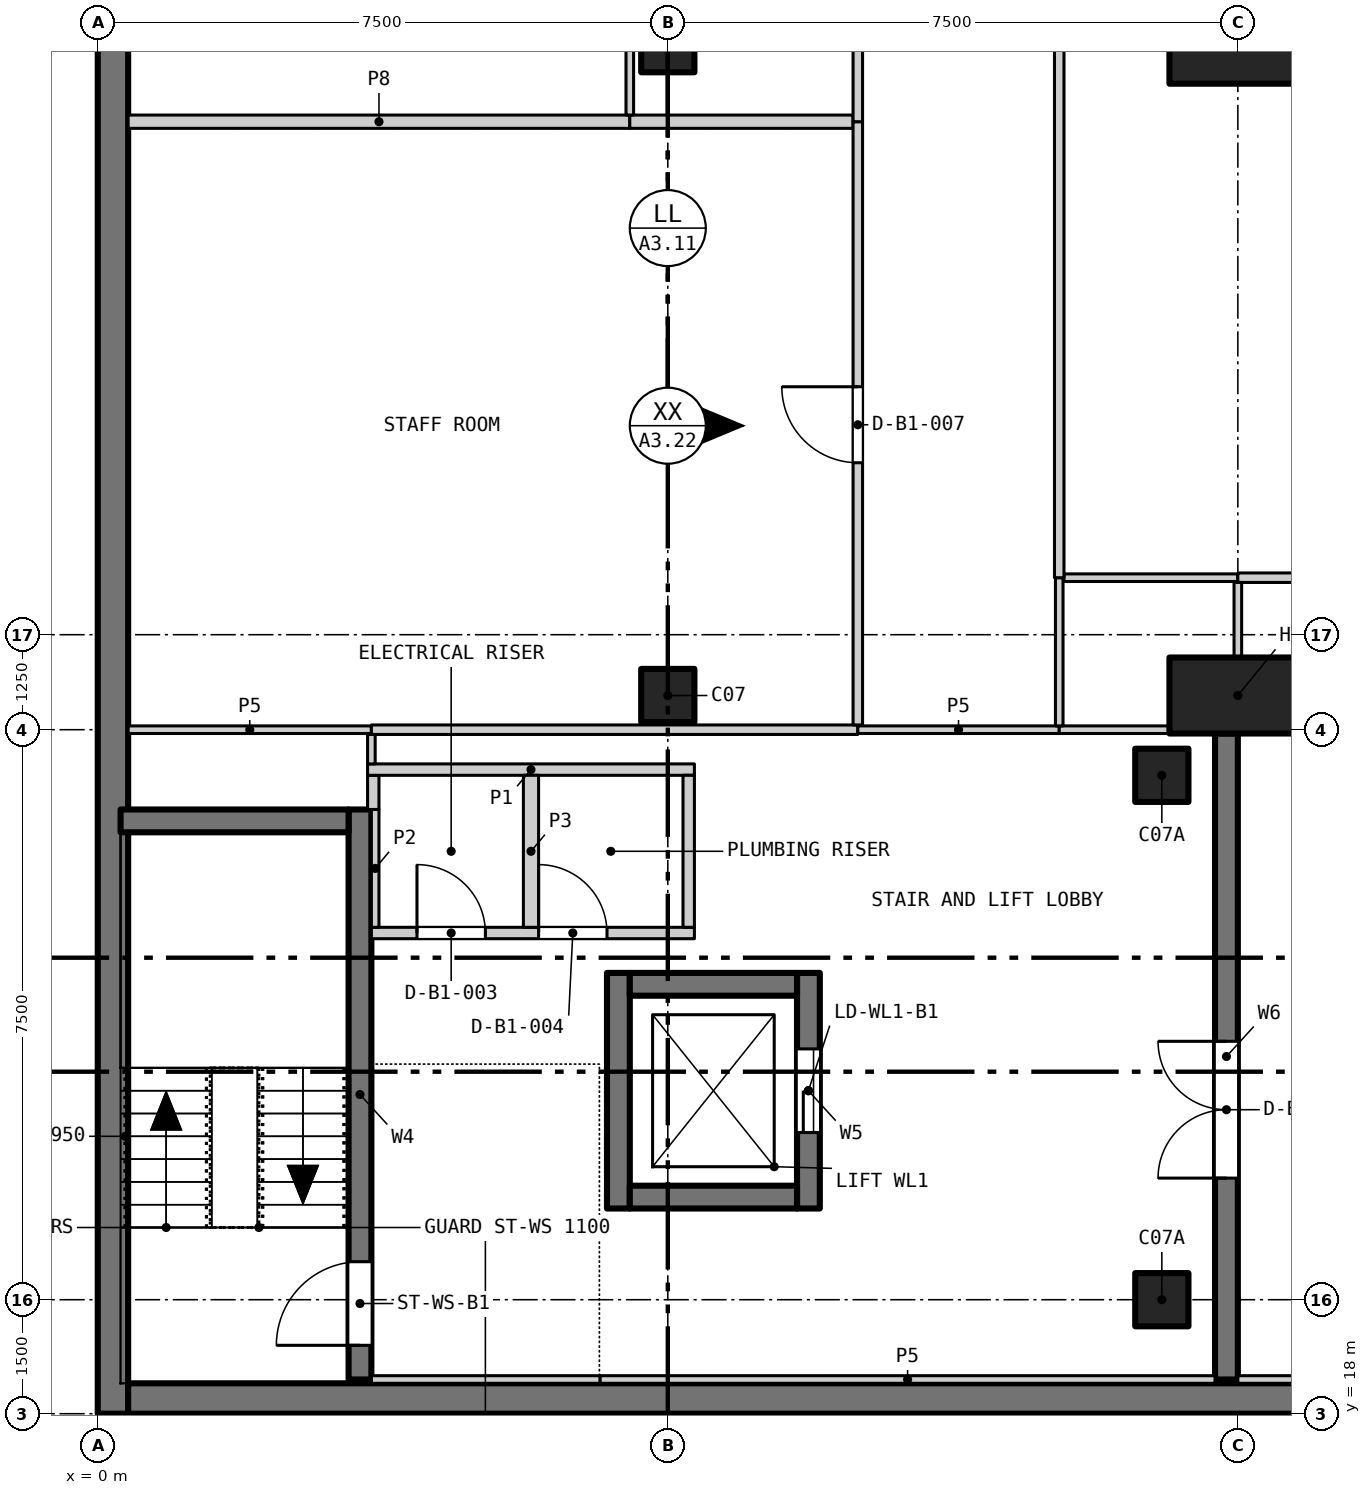
"""IFC4 building model, lengths in metres.
Left out: names, types, materials, properties, quantities, classifications, styles, units other than length and angle.
Written with IfcOpenShell. Run it as: python <this file> out.ifc"""

import sys

from ifc_helpers import new_model, si_unit, direction, frame, frame_2d, origin, origin_2d, place, context, subcontext, project, spatial, rectangle, extrude, element, fill, save


model = new_model("IFC4")
c1 = context("Model", 3, precision=1e-05, world=origin(), true_north=direction((0.0, 1.0)))
c2 = subcontext(c1, "Body", "Model", "MODEL_VIEW")
j1 = project(units=[si_unit("LENGTHUNIT", "METRE"), si_unit("PLANEANGLEUNIT", "RADIAN")], contexts=[c1])
p1 = place(None, origin())
s1 = spatial("IfcSite", under=j1, at=p1, CompositionType="ELEMENT")
p2 = place(p1, origin())
s2 = spatial("IfcBuilding", under=s1, at=p2, CompositionType="ELEMENT")
p3 = place(p2, frame((0.0, 0.0, -10.0)))
s3 = spatial("IfcBuildingStorey", under=s2, at=p3, CompositionType="ELEMENT", Elevation=-10.0)
for number, where, z_axis, x_axis in (
    (1, (7.5, 27.45, -1.4), (0.0, 0.0, 1.0), (1.0, 0.0, 0.0)),
    (2, (7.5, 36.0, -1.4), (0.0, 0.0, 1.0), (1.0, 0.0, 0.0)),
    (3, (14.0, 19.5, -1.4), (0.0, 0.0, 1.0), (1.0, 0.0, 0.0)),
    (4, (14.0, 26.4, -1.4), (0.0, 0.0, 1.0), (1.0, 0.0, 0.0)),
):
    element("IfcColumn", number, at=place(p3, frame(where, z_axis=z_axis, x_axis=x_axis)), inside=s3, PredefinedType="COLUMN", context=c2, shape_type="SweptSolid", body=[
        extrude(rectangle(XDim=0.7, YDim=0.7, at=origin_2d()), origin(), (0.0, 0.0, 1.0), 6.4),
    ])
p4 = place(p3, frame((0.2, 18.0, -1.4), z_axis=(0.0, 0.0, 1.0), x_axis=(0.0, 1.0, 0.0)))
e5 = element("IfcWall", 5, at=p4, inside=s3, PredefinedType="SOLIDWALL", context=c2, shape_type="SweptSolid", body=[
    extrude(rectangle(XDim=108.0, YDim=0.4, at=frame_2d((54.0, 0.0))), origin(), (0.0, 0.0, 1.0), 6.4),
])
p5 = place(p3, frame((0.4, 18.2, -1.4), z_axis=(0.0, 0.0, 1.0), x_axis=(1.0, 0.0, 0.0)))
e6 = element("IfcWall", 6, at=p5, inside=s3, PredefinedType="SOLIDWALL", context=c2, shape_type="SweptSolid", body=[
    extrude(rectangle(XDim=57.2, YDim=0.4, at=frame_2d((28.6, 0.0))), origin(), (0.0, 0.0, 1.0), 6.4),
])
p6 = place(p3, frame((14.85, 18.45, -1.4), z_axis=(0.0, 0.0, 1.0), x_axis=(0.0, 1.0, 0.0)))
e7 = element("IfcWall", 7, at=p6, inside=s3, PredefinedType="SOLIDWALL", context=c2, shape_type="SweptSolid", body=[
    extrude(rectangle(XDim=8.5, YDim=0.3, at=frame_2d((4.25, 0.0))), origin(), (0.0, 0.0, 1.0), 6.4),
])
p7 = place(p6, frame((2.65, 0.0, 1.4)))
e8 = element("IfcOpeningElement", 8, at=p7, cuts=e7, PredefinedType="OPENING", context=c2, shape_type="SweptSolid", body=[
    extrude(rectangle(XDim=1.8, YDim=2.1, at=frame_2d((0.9, 1.05))), frame((0.0, 0.16, 0.0), z_axis=(0.0, -1.0, 0.0), x_axis=(1.0, 0.0, 0.0)), (0.0, 0.0, 1.0), 0.32),
])
p8 = place(p3, frame((3.45, 18.45, 0.0), z_axis=(0.0, 0.0, 1.0), x_axis=(0.0, 1.0, 0.0)))
e9 = element("IfcWall", 9, at=p8, inside=s3, PredefinedType="SHEAR", context=c2, shape_type="SweptSolid", body=[
    extrude(rectangle(XDim=7.5, YDim=0.3, at=frame_2d((3.75, 0.0))), origin(), (0.0, 0.0, 1.0), 5.0),
])
p9 = place(p8, frame((0.45, 0.0, 0.0)))
e10 = element("IfcOpeningElement", 10, at=p9, cuts=e9, PredefinedType="OPENING", context=c2, shape_type="SweptSolid", body=[
    extrude(rectangle(XDim=1.1, YDim=2.1, at=frame_2d((0.55, 1.05))), frame((0.0, 0.16, 0.0), z_axis=(0.0, -1.0, 0.0), x_axis=(1.0, 0.0, 0.0)), (0.0, 0.0, 1.0), 0.32),
])
p10 = place(p3, frame((0.3, 25.8, 0.0), z_axis=(0.0, 0.0, 1.0), x_axis=(1.0, 0.0, 0.0)))
e11 = element("IfcWall", 11, at=p10, inside=s3, PredefinedType="SHEAR", context=c2, shape_type="SweptSolid", body=[
    extrude(rectangle(XDim=3.0, YDim=0.3, at=frame_2d((1.5, 0.0))), origin(), (0.0, 0.0, 1.0), 5.0),
])
p11 = place(p3, frame((6.85, 20.7, -1.4), z_axis=(0.0, 0.0, 1.0), x_axis=(0.0, 1.0, 0.0)))
e12 = element("IfcWall", 12, at=p11, inside=s3, PredefinedType="SHEAR", context=c2, shape_type="SweptSolid", body=[
    extrude(rectangle(XDim=3.1, YDim=0.3, at=frame_2d((1.55, 0.0))), origin(), (0.0, 0.0, 1.0), 6.4),
])
p12 = place(p3, frame((9.35, 20.7, -1.4), z_axis=(0.0, 0.0, 1.0), x_axis=(0.0, 1.0, 0.0)))
e13 = element("IfcWall", 13, at=p12, inside=s3, PredefinedType="SHEAR", context=c2, shape_type="SweptSolid", body=[
    extrude(rectangle(XDim=3.1, YDim=0.3, at=frame_2d((1.55, 0.0))), origin(), (0.0, 0.0, 1.0), 6.4),
])
p13 = place(p12, frame((1.0, 0.0, 1.4)))
e14 = element("IfcOpeningElement", 14, at=p13, cuts=e13, PredefinedType="OPENING", context=c2, shape_type="SweptSolid", body=[
    extrude(rectangle(XDim=1.1, YDim=2.1, at=frame_2d((0.55, 1.05))), frame((0.0, 0.16, 0.0), z_axis=(0.0, -1.0, 0.0), x_axis=(1.0, 0.0, 0.0)), (0.0, 0.0, 1.0), 0.32),
])
for number, where, z_axis, x_axis in (
    (15, (7.0, 20.85, -1.4), (0.0, 0.0, 1.0), (1.0, 0.0, 0.0)),
    (16, (7.0, 23.65, -1.4), (0.0, 0.0, 1.0), (1.0, 0.0, 0.0)),
):
    element("IfcWall", number, at=place(p3, frame(where, z_axis=z_axis, x_axis=x_axis)), inside=s3, PredefinedType="SHEAR", context=c2, shape_type="SweptSolid", body=[
        extrude(rectangle(XDim=2.2, YDim=0.3, at=frame_2d((1.1, 0.0))), origin(), (0.0, 0.0, 1.0), 6.4),
    ])
for number, where, z_axis, x_axis in (
    (17, (15.0, 27.45, -1.4), (0.0, 0.0, 1.0), (1.0, 0.0, 0.0)),
    (18, (15.0, 36.0, -1.4), (0.0, 0.0, 1.0), (1.0, 0.0, 0.0)),
):
    element("IfcColumn", number, at=place(p3, frame(where, z_axis=z_axis, x_axis=x_axis)), inside=s3, PredefinedType="COLUMN", context=c2, shape_type="SweptSolid", body=[
        extrude(rectangle(XDim=1.8, YDim=1.0, at=origin_2d()), origin(), (0.0, 0.0, 1.0), 6.4),
    ])
p14 = place(p3, frame((3.625, 25.95, 0.0), z_axis=(0.0, 0.0, 1.0), x_axis=(0.0, 1.0, 0.0)))
e19 = element("IfcWall", 19, at=p14, inside=s3, PredefinedType="PARTITIONING", context=c2, shape_type="SweptSolid", body=[
    extrude(rectangle(XDim=0.45, YDim=0.15, at=frame_2d((0.225, 0.0))), origin(), (0.0, 0.0, 1.0), 4.75),
])
p15 = place(p3, frame((3.55, 26.475, 0.0), z_axis=(0.0, 0.0, 1.0), x_axis=(1.0, 0.0, 0.0)))
e20 = element("IfcWall", 20, at=p15, inside=s3, PredefinedType="PARTITIONING", context=c2, shape_type="SweptSolid", body=[
    extrude(rectangle(XDim=4.3, YDim=0.15, at=frame_2d((2.15, 0.0))), origin(), (0.0, 0.0, 1.0), 3.35),
])
p16 = place(p3, frame((3.6, 24.325, 0.0), z_axis=(0.0, 0.0, 1.0), x_axis=(1.0, 0.0, 0.0)))
e21 = element("IfcWall", 21, at=p16, inside=s3, PredefinedType="PARTITIONING", context=c2, shape_type="SweptSolid", body=[
    extrude(rectangle(XDim=4.25, YDim=0.15, at=frame_2d((2.125, 0.0))), origin(), (0.0, 0.0, 1.0), 4.75),
])
p17 = place(p16, frame((0.6, 0.0, 0.0)))
e22 = element("IfcOpeningElement", 22, at=p17, cuts=e21, PredefinedType="OPENING", context=c2, shape_type="SweptSolid", body=[
    extrude(rectangle(XDim=0.9, YDim=2.1, at=frame_2d((0.45, 1.05))), frame((0.0, 0.085, 0.0), z_axis=(0.0, -1.0, 0.0), x_axis=(1.0, 0.0, 0.0)), (0.0, 0.0, 1.0), 0.17),
])
p18 = place(p16, frame((2.2, 0.0, 0.0)))
e23 = element("IfcOpeningElement", 23, at=p18, cuts=e21, PredefinedType="OPENING", context=c2, shape_type="SweptSolid", body=[
    extrude(rectangle(XDim=0.9, YDim=2.1, at=frame_2d((0.45, 1.05))), frame((0.0, 0.085, 0.0), z_axis=(0.0, -1.0, 0.0), x_axis=(1.0, 0.0, 0.0)), (0.0, 0.0, 1.0), 0.17),
])
p19 = place(p3, frame((3.65, 24.4, 0.0), z_axis=(0.0, 0.0, 1.0), x_axis=(0.0, 1.0, 0.0)))
e24 = element("IfcWall", 24, at=p19, inside=s3, PredefinedType="PARTITIONING", context=c2, shape_type="SweptSolid", body=[
    extrude(rectangle(XDim=1.55, YDim=0.1, at=frame_2d((0.775, 0.0))), origin(), (0.0, 0.0, 1.0), 4.75),
])
p20 = place(p3, frame((5.7, 24.4, 0.0), z_axis=(0.0, 0.0, 1.0), x_axis=(0.0, 1.0, 0.0)))
e25 = element("IfcWall", 25, at=p20, inside=s3, PredefinedType="PARTITIONING", context=c2, shape_type="SweptSolid", body=[
    extrude(rectangle(XDim=2.0, YDim=0.2, at=frame_2d((1.0, 0.0))), origin(), (0.0, 0.0, 1.0), 4.75),
])
p21 = place(p3, frame((7.775, 24.4, 0.0), z_axis=(0.0, 0.0, 1.0), x_axis=(0.0, 1.0, 0.0)))
e26 = element("IfcWall", 26, at=p21, inside=s3, PredefinedType="PARTITIONING", context=c2, shape_type="SweptSolid", body=[
    extrude(rectangle(XDim=2.0, YDim=0.15, at=frame_2d((1.0, 0.0))), origin(), (0.0, 0.0, 1.0), 4.75),
])
p22 = place(p3, frame((3.6, 18.45, 0.0), z_axis=(0.0, 0.0, 1.0), x_axis=(1.0, 0.0, 0.0)))
e27 = element("IfcWall", 27, at=p22, inside=s3, PredefinedType="PARTITIONING", context=c2, shape_type="SweptSolid", body=[
    extrude(rectangle(XDim=3.01, YDim=0.1, at=frame_2d((1.505, 0.0))), origin(), (0.0, 0.0, 1.0), 4.75),
])
p23 = place(p3, frame((6.61, 18.45, 0.0), z_axis=(0.0, 0.0, 1.0), x_axis=(1.0, 0.0, 0.0)))
e28 = element("IfcWall", 28, at=p23, inside=s3, PredefinedType="PARTITIONING", context=c2, shape_type="SweptSolid", body=[
    extrude(rectangle(XDim=8.09, YDim=0.1, at=frame_2d((4.045, 0.0))), origin(), (0.0, 0.0, 1.0), 4.75),
])
p24 = place(p3, frame((15.0, 18.45, 0.0), z_axis=(0.0, 0.0, 1.0), x_axis=(1.0, 0.0, 0.0)))
e29 = element("IfcWall", 29, at=p24, inside=s3, PredefinedType="PARTITIONING", context=c2, shape_type="SweptSolid", body=[
    extrude(rectangle(XDim=28.0, YDim=0.1, at=frame_2d((14.0, 0.0))), origin(), (0.0, 0.0, 1.0), 4.75),
])
p25 = place(p3, frame((0.4, 27.0, 0.0), z_axis=(0.0, 0.0, 1.0), x_axis=(1.0, 0.0, 0.0)))
e30 = element("IfcWall", 30, at=p25, inside=s3, PredefinedType="PARTITIONING", context=c2, shape_type="SweptSolid", body=[
    extrude(rectangle(XDim=3.2, YDim=0.1, at=frame_2d((1.6, 0.0))), origin(), (0.0, 0.0, 1.0), 4.75),
])
p26 = place(p3, frame((3.6, 27.0, 0.0), z_axis=(0.0, 0.0, 1.0), x_axis=(1.0, 0.0, 0.0)))
e31 = element("IfcWall", 31, at=p26, inside=s3, PredefinedType="PARTITIONING", context=c2, shape_type="SweptSolid", body=[
    extrude(rectangle(XDim=6.4, YDim=0.125, at=frame_2d((3.2, 0.0))), origin(), (0.0, 0.0, 1.0), 4.75),
])
p27 = place(p3, frame((10.0, 27.0, 0.0), z_axis=(0.0, 0.0, 1.0), x_axis=(1.0, 0.0, 0.0)))
e32 = element("IfcWall", 32, at=p27, inside=s3, PredefinedType="PARTITIONING", context=c2, shape_type="SweptSolid", body=[
    extrude(rectangle(XDim=2.65, YDim=0.1, at=frame_2d((1.325, 0.0))), origin(), (0.0, 0.0, 1.0), 4.75),
])
p28 = place(p3, frame((12.65, 27.0, 0.0), z_axis=(0.0, 0.0, 1.0), x_axis=(1.0, 0.0, 0.0)))
e33 = element("IfcWall", 33, at=p28, inside=s3, PredefinedType="PARTITIONING", context=c2, shape_type="SweptSolid", body=[
    extrude(rectangle(XDim=1.45, YDim=0.1, at=frame_2d((0.725, 0.0))), origin(), (0.0, 0.0, 1.0), 4.75),
])
p29 = place(p3, frame((12.712, 29.0, 0.0), z_axis=(0.0, 0.0, 1.0), x_axis=(1.0, 0.0, 0.0)))
e34 = element("IfcWall", 34, at=p29, inside=s3, PredefinedType="PARTITIONING", context=c2, shape_type="SweptSolid", body=[
    extrude(rectangle(XDim=2.288, YDim=0.1, at=frame_2d((1.144, 0.0))), origin(), (0.0, 0.0, 1.0), 4.75),
])
p30 = place(p3, frame((15.0, 29.0, 0.0), z_axis=(0.0, 0.0, 1.0), x_axis=(1.0, 0.0, 0.0)))
e35 = element("IfcWall", 35, at=p30, inside=s3, PredefinedType="PARTITIONING", context=c2, shape_type="SweptSolid", body=[
    extrude(rectangle(XDim=14.99, YDim=0.125, at=frame_2d((7.495, 0.0))), origin(), (0.0, 0.0, 1.0), 4.75),
])
p31 = place(p3, frame((0.4, 35.0, 0.0), z_axis=(0.0, 0.0, 1.0), x_axis=(1.0, 0.0, 0.0)))
e36 = element("IfcWall", 36, at=p31, inside=s3, PredefinedType="PARTITIONING", context=c2, shape_type="SweptSolid", body=[
    extrude(rectangle(XDim=6.6, YDim=0.175, at=frame_2d((3.3, 0.0))), origin(), (0.0, 0.0, 1.0), 4.75),
])
p32 = place(p3, frame((7.0, 35.0, 0.0), z_axis=(0.0, 0.0, 1.0), x_axis=(1.0, 0.0, 0.0)))
e37 = element("IfcWall", 37, at=p32, inside=s3, PredefinedType="PARTITIONING", context=c2, shape_type="SweptSolid", body=[
    extrude(rectangle(XDim=2.938, YDim=0.175, at=frame_2d((1.469, 0.0))), origin(), (0.0, 0.0, 1.0), 4.75),
])
p33 = place(p3, frame((3.6, 26.55, 0.0), z_axis=(0.0, 0.0, 1.0), x_axis=(0.0, 1.0, 0.0)))
e38 = element("IfcWall", 38, at=p33, inside=s3, PredefinedType="PARTITIONING", context=c2, shape_type="SweptSolid", body=[
    extrude(rectangle(XDim=0.387, YDim=0.1, at=frame_2d((0.194, 0.0))), origin(), (0.0, 0.0, 1.0), 4.75),
])
p34 = place(p3, frame((7.0, 35.087, 0.0), z_axis=(0.0, 0.0, 1.0), x_axis=(0.0, 1.0, 0.0)))
e39 = element("IfcWall", 39, at=p34, inside=s3, PredefinedType="PARTITIONING", context=c2, shape_type="SweptSolid", body=[
    extrude(rectangle(XDim=2.913, YDim=0.1, at=frame_2d((1.456, 0.0))), origin(), (0.0, 0.0, 1.0), 4.75),
])
p35 = place(p34, frame((1.3, 0.0, 0.0)))
e40 = element("IfcOpeningElement", 40, at=p35, cuts=e39, PredefinedType="OPENING", context=c2, shape_type="SweptSolid", body=[
    extrude(rectangle(XDim=1.0, YDim=2.1, at=frame_2d((0.5, 1.05))), frame((0.0, 0.06, 0.0), z_axis=(0.0, -1.0, 0.0), x_axis=(1.0, 0.0, 0.0)), (0.0, 0.0, 1.0), 0.12),
])
p36 = place(p3, frame((10.0, 27.062, 0.0), z_axis=(0.0, 0.0, 1.0), x_axis=(0.0, 1.0, 0.0)))
e41 = element("IfcWall", 41, at=p36, inside=s3, PredefinedType="PARTITIONING", context=c2, shape_type="SweptSolid", body=[
    extrude(rectangle(XDim=7.938, YDim=0.125, at=frame_2d((3.969, 0.0))), origin(), (0.0, 0.0, 1.0), 4.75),
])
p37 = place(p36, frame((3.45, 0.0, 0.0)))
e42 = element("IfcOpeningElement", 42, at=p37, cuts=e41, PredefinedType="OPENING", context=c2, shape_type="SweptSolid", body=[
    extrude(rectangle(XDim=1.0, YDim=2.1, at=frame_2d((0.5, 1.05))), frame((0.0, 0.073, 0.0), z_axis=(0.0, -1.0, 0.0), x_axis=(1.0, 0.0, 0.0)), (0.0, 0.0, 1.0), 0.145),
])
p38 = place(p3, frame((10.0, 35.0, 0.0), z_axis=(0.0, 0.0, 1.0), x_axis=(0.0, 1.0, 0.0)))
e43 = element("IfcWall", 43, at=p38, inside=s3, PredefinedType="PARTITIONING", context=c2, shape_type="SweptSolid", body=[
    extrude(rectangle(XDim=9.0, YDim=0.125, at=frame_2d((4.5, 0.0))), origin(), (0.0, 0.0, 1.0), 4.75),
])
p39 = place(p38, frame((4.0, 0.0, 0.0)))
e44 = element("IfcOpeningElement", 44, at=p39, cuts=e43, PredefinedType="OPENING", context=c2, shape_type="SweptSolid", body=[
    extrude(rectangle(XDim=1.0, YDim=2.1, at=frame_2d((0.5, 1.05))), frame((0.0, 0.073, 0.0), z_axis=(0.0, -1.0, 0.0), x_axis=(1.0, 0.0, 0.0)), (0.0, 0.0, 1.0), 0.145),
])
p40 = place(p3, frame((12.65, 27.05, 0.0), z_axis=(0.0, 0.0, 1.0), x_axis=(0.0, 1.0, 0.0)))
e45 = element("IfcWall", 45, at=p40, inside=s3, PredefinedType="PARTITIONING", context=c2, shape_type="SweptSolid", body=[
    extrude(rectangle(XDim=1.95, YDim=0.1, at=frame_2d((0.975, 0.0))), origin(), (0.0, 0.0, 1.0), 4.75),
])
p41 = place(p3, frame((12.65, 29.0, 0.0), z_axis=(0.0, 0.0, 1.0), x_axis=(0.0, 1.0, 0.0)))
e46 = element("IfcWall", 46, at=p41, inside=s3, PredefinedType="PARTITIONING", context=c2, shape_type="SweptSolid", body=[
    extrude(rectangle(XDim=20.5, YDim=0.125, at=frame_2d((10.25, 0.0))), origin(), (0.0, 0.0, 1.0), 4.75),
])
p42 = place(p3, frame((15.0, 27.95, 0.0), z_axis=(0.0, 0.0, 1.0), x_axis=(0.0, 1.0, 0.0)))
e47 = element("IfcWall", 47, at=p42, inside=s3, PredefinedType="PARTITIONING", context=c2, shape_type="SweptSolid", body=[
    extrude(rectangle(XDim=0.988, YDim=0.1, at=frame_2d((0.494, 0.0))), origin(), (0.0, 0.0, 1.0), 4.75),
])
p43 = place(p7, origin())
e48 = element("IfcDoor", 48, at=p43, inside=s3, OperationType="DOUBLE_DOOR_SINGLE_SWING", PredefinedType="DOOR", context=c2, shape_type="SweptSolid", body=[
    extrude(rectangle(XDim=1.8, YDim=2.1, at=frame_2d((0.9, 1.05))), frame((0.0, 0.025, 0.0), z_axis=(0.0, -1.0, 0.0), x_axis=(1.0, 0.0, 0.0)), (0.0, 0.0, 1.0), 0.05),
])
fill(e8, e48)
p44 = place(p17, origin())
e49 = element("IfcDoor", 49, at=p44, inside=s3, OperationType="SINGLE_SWING_LEFT", PredefinedType="DOOR", context=c2, shape_type="SweptSolid", body=[
    extrude(rectangle(XDim=0.9, YDim=2.1, at=frame_2d((0.45, 1.05))), frame((0.0, 0.025, 0.0), z_axis=(0.0, -1.0, 0.0), x_axis=(1.0, 0.0, 0.0)), (0.0, 0.0, 1.0), 0.05),
])
fill(e22, e49)
p45 = place(p18, origin())
e50 = element("IfcDoor", 50, at=p45, inside=s3, OperationType="SINGLE_SWING_LEFT", PredefinedType="DOOR", context=c2, shape_type="SweptSolid", body=[
    extrude(rectangle(XDim=0.9, YDim=2.1, at=frame_2d((0.45, 1.05))), frame((0.0, 0.025, 0.0), z_axis=(0.0, -1.0, 0.0), x_axis=(1.0, 0.0, 0.0)), (0.0, 0.0, 1.0), 0.05),
])
fill(e23, e50)
p46 = place(p37, origin())
e51 = element("IfcDoor", 51, at=p46, inside=s3, OperationType="SINGLE_SWING_RIGHT", PredefinedType="DOOR", context=c2, shape_type="SweptSolid", body=[
    extrude(rectangle(XDim=1.0, YDim=2.1, at=frame_2d((0.5, 1.05))), frame((0.0, 0.025, 0.0), z_axis=(0.0, -1.0, 0.0), x_axis=(1.0, 0.0, 0.0)), (0.0, 0.0, 1.0), 0.05),
])
fill(e42, e51)
p47 = place(p9, origin())
e52 = element("IfcDoor", 52, at=p47, inside=s3, OperationType="SINGLE_SWING_LEFT", PredefinedType="DOOR", context=c2, shape_type="SweptSolid", body=[
    extrude(rectangle(XDim=1.1, YDim=2.1, at=frame_2d((0.55, 1.05))), frame((0.0, 0.025, 0.0), z_axis=(0.0, -1.0, 0.0), x_axis=(1.0, 0.0, 0.0)), (0.0, 0.0, 1.0), 0.05),
])
fill(e10, e52)
p48 = place(p13, origin())
e53 = element("IfcDoor", 53, at=p48, inside=s3, OperationType="SLIDING_TO_LEFT", PredefinedType="DOOR", context=c2, shape_type="SweptSolid", body=[
    extrude(rectangle(XDim=1.1, YDim=2.1, at=frame_2d((0.55, 1.05))), frame((0.0, 0.025, 0.0), z_axis=(0.0, -1.0, 0.0), x_axis=(1.0, 0.0, 0.0)), (0.0, 0.0, 1.0), 0.05),
])
fill(e14, e53)
save(model, sys.argv[1])
